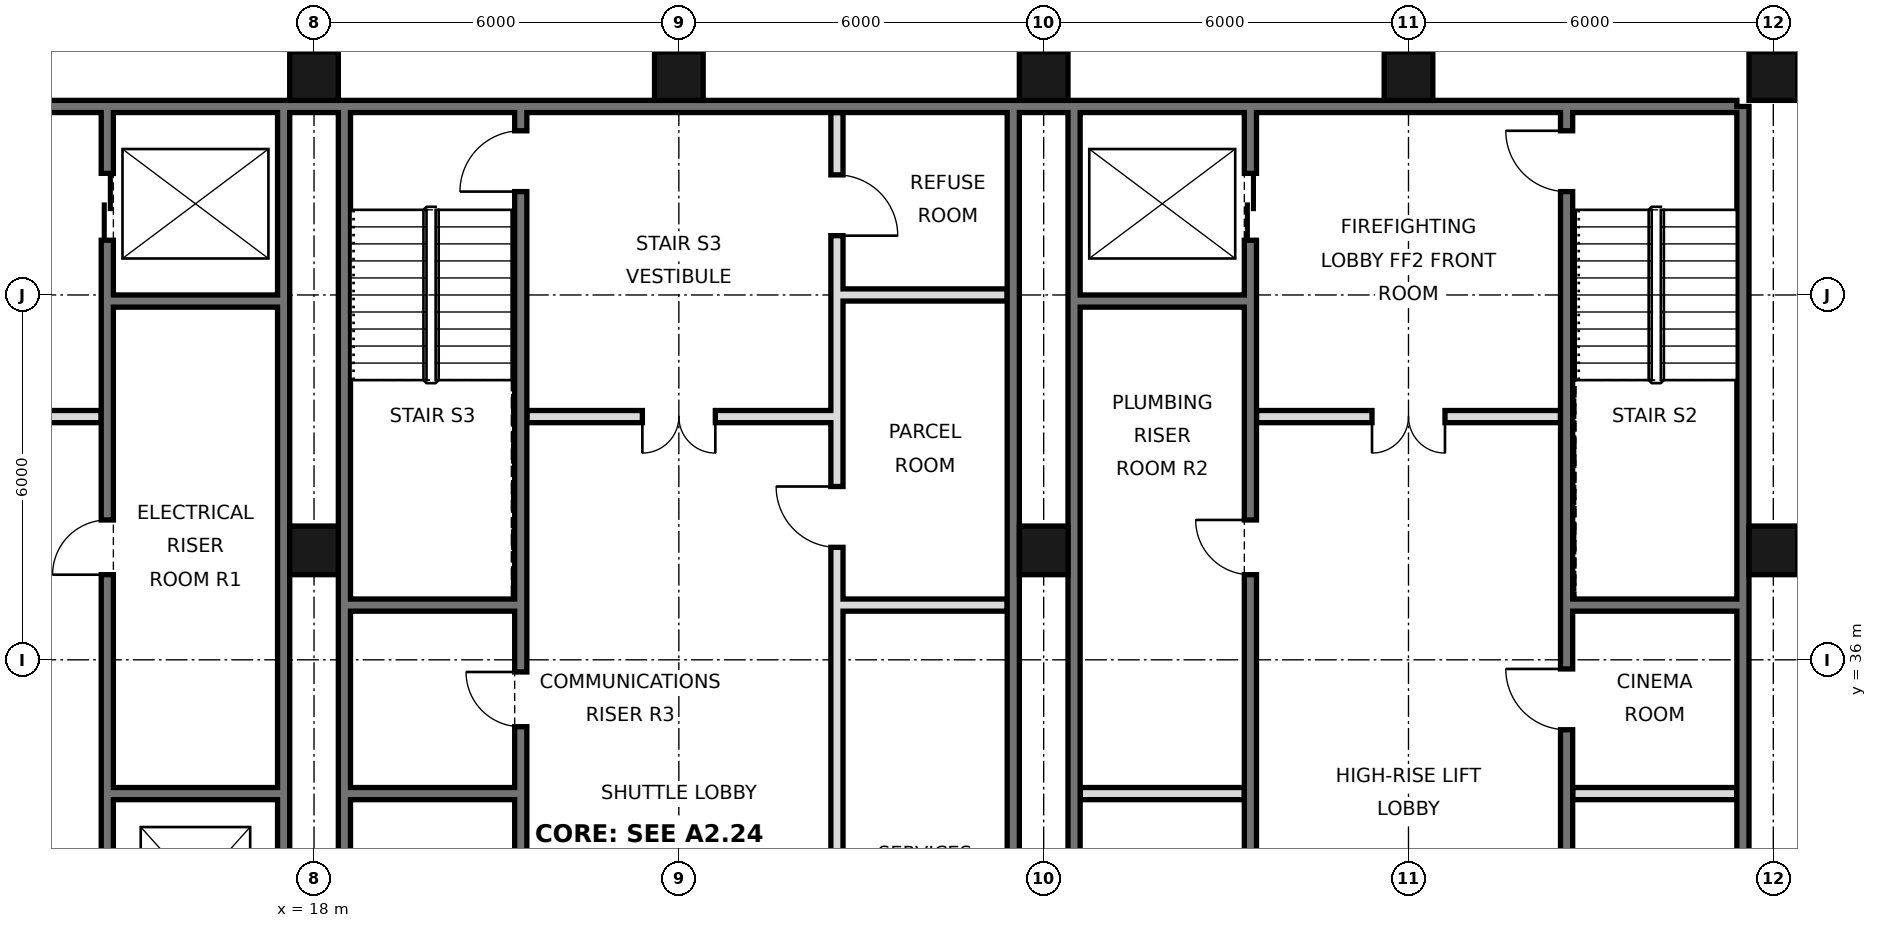
"""IFC4 building model, lengths in metres.
Left out: names, types, materials, properties, quantities, classifications, styles, units other than length and angle.
Written with IfcOpenShell. Run it as: python <this file> out.ifc"""

import sys

from ifc_helpers import new_model, si_unit, direction, frame, frame_2d, origin, origin_2d, place, context, subcontext, project, spatial, rectangle, hollow_rectangle, extrude, element, fill, save


model = new_model("IFC4")
c1 = context("Model", 3, precision=1e-05, world=origin(), true_north=direction((0.0, 1.0)))
c2 = subcontext(c1, "Body", "Model", "MODEL_VIEW")
j1 = project(units=[si_unit("LENGTHUNIT", "METRE"), si_unit("PLANEANGLEUNIT", "RADIAN")], contexts=[c1])
p1 = place(None, origin())
s1 = spatial("IfcSite", under=j1, at=p1, CompositionType="ELEMENT")
p2 = place(p1, origin())
s2 = spatial("IfcBuilding", under=s1, at=p2, CompositionType="ELEMENT")
p3 = place(p2, frame((0.0, 0.0, 96.2)))
s3 = spatial("IfcBuildingStorey", under=s2, at=p3, CompositionType="ELEMENT", Elevation=96.2)
for number, where, z_axis, x_axis in (
    (1, (18.0, 37.8, 0.0), (0.0, 0.0, 1.0), (1.0, 0.0, 0.0)),
    (2, (18.0, 45.6, 0.0), (0.0, 0.0, 1.0), (1.0, 0.0, 0.0)),
    (3, (24.0, 45.6, 0.0), (0.0, 0.0, 1.0), (1.0, 0.0, 0.0)),
    (4, (30.0, 37.8, 0.0), (0.0, 0.0, 1.0), (1.0, 0.0, 0.0)),
    (5, (30.0, 45.6, 0.0), (0.0, 0.0, 1.0), (1.0, 0.0, 0.0)),
    (6, (36.0, 45.6, 0.0), (0.0, 0.0, 1.0), (1.0, 0.0, 0.0)),
    (7, (42.0, 37.8, 0.0), (0.0, 0.0, 1.0), (1.0, 0.0, 0.0)),
    (8, (42.0, 45.6, 0.0), (0.0, 0.0, 1.0), (1.0, 0.0, 0.0)),
):
    element("IfcColumn", number, at=place(p3, frame(where, z_axis=z_axis, x_axis=x_axis)), inside=s3, PredefinedType="COLUMN", context=c2, shape_type="SweptSolid", body=[
        extrude(hollow_rectangle(XDim=0.8, YDim=0.8, WallThickness=0.05, at=origin_2d()), origin(), (0.0, 0.0, 1.0), 3.6),
    ])
p4 = place(p3, frame((41.5, 21.6, 0.0), z_axis=(0.0, 0.0, 1.0), x_axis=(0.0, 1.0, 0.0)))
e9 = element("IfcWall", 9, at=p4, inside=s3, PredefinedType="SOLIDWALL", context=c2, shape_type="SweptSolid", body=[
    extrude(rectangle(XDim=23.5, YDim=0.2, at=frame_2d((11.75, 0.0))), origin(), (0.0, 0.0, 1.0), 3.42),
])
p5 = place(p3, frame((6.6, 45.1, 0.0), z_axis=(0.0, 0.0, 1.0), x_axis=(1.0, 0.0, 0.0)))
e10 = element("IfcWall", 10, at=p5, inside=s3, PredefinedType="SOLIDWALL", context=c2, shape_type="SweptSolid", body=[
    extrude(rectangle(XDim=34.8, YDim=0.2, at=frame_2d((17.4, 0.0))), origin(), (0.0, 0.0, 1.0), 3.42),
])
for number, where, z_axis, x_axis in (
    (11, (17.5, 27.6, 0.0), (0.0, 0.0, 1.0), (0.0, 1.0, 0.0)),
    (12, (18.5, 27.6, 0.0), (0.0, 0.0, 1.0), (0.0, 1.0, 0.0)),
    (13, (29.5, 27.6, 0.0), (0.0, 0.0, 1.0), (0.0, 1.0, 0.0)),
    (14, (30.5, 27.6, 0.0), (0.0, 0.0, 1.0), (0.0, 1.0, 0.0)),
):
    element("IfcWall", number, at=place(p3, frame(where, z_axis=z_axis, x_axis=x_axis)), inside=s3, PredefinedType="SOLIDWALL", context=c2, shape_type="SweptSolid", body=[
        extrude(rectangle(XDim=17.5, YDim=0.2, at=frame_2d((8.75, 0.0))), origin(), (0.0, 0.0, 1.0), 3.42),
    ])
p6 = place(p3, frame((14.6, 27.5, 0.0), z_axis=(0.0, 0.0, 1.0), x_axis=(0.0, 1.0, 0.0)))
e15 = element("IfcWall", 15, at=p6, inside=s3, PredefinedType="SOLIDWALL", context=c2, shape_type="SweptSolid", body=[
    extrude(rectangle(XDim=17.5, YDim=0.2, at=frame_2d((8.75, 0.0))), origin(), (0.0, 0.0, 1.0), 3.42),
])
p7 = place(p6, frame((1.1, 0.0, 0.0)))
e16 = element("IfcOpeningElement", 16, at=p7, cuts=e15, PredefinedType="OPENING", context=c2, shape_type="SweptSolid", body=[
    extrude(rectangle(XDim=1.1, YDim=2.1, at=frame_2d((0.55, 1.05))), frame((0.0, 0.11, 0.0), z_axis=(0.0, -1.0, 0.0), x_axis=(1.0, 0.0, 0.0)), (0.0, 0.0, 1.0), 0.22),
])
p8 = place(p6, frame((4.2, 0.0, 0.0)))
e17 = element("IfcOpeningElement", 17, at=p8, cuts=e15, PredefinedType="OPENING", context=c2, shape_type="SweptSolid", body=[
    extrude(rectangle(XDim=1.1, YDim=2.1, at=frame_2d((0.55, 1.05))), frame((0.0, 0.11, 0.0), z_axis=(0.0, -1.0, 0.0), x_axis=(1.0, 0.0, 0.0)), (0.0, 0.0, 1.0), 0.22),
])
p9 = place(p6, frame((15.4, 0.0, 0.0)))
e18 = element("IfcOpeningElement", 18, at=p9, cuts=e15, PredefinedType="OPENING", context=c2, shape_type="SweptSolid", body=[
    extrude(rectangle(XDim=1.1, YDim=2.1, at=frame_2d((0.55, 1.05))), frame((0.0, 0.11, 0.0), z_axis=(0.0, -1.0, 0.0), x_axis=(1.0, 0.0, 0.0)), (0.0, 0.0, 1.0), 0.22),
])
p10 = place(p6, frame((9.9, 0.0, 0.0)))
e19 = element("IfcOpeningElement", 19, at=p10, cuts=e15, PredefinedType="OPENING", context=c2, shape_type="SweptSolid", body=[
    extrude(rectangle(XDim=0.9, YDim=2.1, at=frame_2d((0.45, 1.05))), frame((0.0, 0.11, 0.0), z_axis=(0.0, -1.0, 0.0), x_axis=(1.0, 0.0, 0.0)), (0.0, 0.0, 1.0), 0.22),
])
p11 = place(p3, frame((21.4, 27.5, 0.0), z_axis=(0.0, 0.0, 1.0), x_axis=(0.0, 1.0, 0.0)))
e20 = element("IfcWall", 20, at=p11, inside=s3, PredefinedType="SOLIDWALL", context=c2, shape_type="SweptSolid", body=[
    extrude(rectangle(XDim=17.5, YDim=0.2, at=frame_2d((8.75, 0.0))), origin(), (0.0, 0.0, 1.0), 3.42),
])
p12 = place(p11, frame((16.2, 0.0, 0.0)))
e21 = element("IfcOpeningElement", 21, at=p12, cuts=e20, PredefinedType="OPENING", context=c2, shape_type="SweptSolid", body=[
    extrude(rectangle(XDim=1.0, YDim=2.1, at=frame_2d((0.5, 1.05))), frame((0.0, 0.11, 0.0), z_axis=(0.0, -1.0, 0.0), x_axis=(1.0, 0.0, 0.0)), (0.0, 0.0, 1.0), 0.22),
])
p13 = place(p11, frame((7.4, 0.0, 0.0)))
e22 = element("IfcOpeningElement", 22, at=p13, cuts=e20, PredefinedType="OPENING", context=c2, shape_type="SweptSolid", body=[
    extrude(rectangle(XDim=0.9, YDim=2.1, at=frame_2d((0.45, 1.05))), frame((0.0, 0.11, 0.0), z_axis=(0.0, -1.0, 0.0), x_axis=(1.0, 0.0, 0.0)), (0.0, 0.0, 1.0), 0.22),
])
p14 = place(p3, frame((26.6, 27.5, 0.0), z_axis=(0.0, 0.0, 1.0), x_axis=(0.0, 1.0, 0.0)))
e23 = element("IfcWall", 23, at=p14, inside=s3, PredefinedType="SOLIDWALL", context=c2, shape_type="SweptSolid", body=[
    extrude(rectangle(XDim=17.5, YDim=0.2, at=frame_2d((8.75, 0.0))), origin(), (0.0, 0.0, 1.0), 3.42),
])
p15 = place(p14, frame((4.3, 0.0, 0.0)))
e24 = element("IfcOpeningElement", 24, at=p15, cuts=e23, PredefinedType="OPENING", context=c2, shape_type="SweptSolid", body=[
    extrude(rectangle(XDim=0.9, YDim=2.1, at=frame_2d((0.45, 1.05))), frame((0.0, 0.11, 0.0), z_axis=(0.0, -1.0, 0.0), x_axis=(1.0, 0.0, 0.0)), (0.0, 0.0, 1.0), 0.22),
])
p16 = place(p14, frame((10.35, 0.0, 0.0)))
e25 = element("IfcOpeningElement", 25, at=p16, cuts=e23, PredefinedType="OPENING", context=c2, shape_type="SweptSolid", body=[
    extrude(rectangle(XDim=1.0, YDim=2.1, at=frame_2d((0.5, 1.05))), frame((0.0, 0.11, 0.0), z_axis=(0.0, -1.0, 0.0), x_axis=(1.0, 0.0, 0.0)), (0.0, 0.0, 1.0), 0.22),
])
p17 = place(p14, frame((15.475, 0.0, 0.0)))
e26 = element("IfcOpeningElement", 26, at=p17, cuts=e23, PredefinedType="OPENING", context=c2, shape_type="SweptSolid", body=[
    extrude(rectangle(XDim=1.0, YDim=2.1, at=frame_2d((0.5, 1.05))), frame((0.0, 0.11, 0.0), z_axis=(0.0, -1.0, 0.0), x_axis=(1.0, 0.0, 0.0)), (0.0, 0.0, 1.0), 0.22),
])
p18 = place(p3, frame((33.4, 27.5, 0.0), z_axis=(0.0, 0.0, 1.0), x_axis=(0.0, 1.0, 0.0)))
e27 = element("IfcWall", 27, at=p18, inside=s3, PredefinedType="SOLIDWALL", context=c2, shape_type="SweptSolid", body=[
    extrude(rectangle(XDim=17.5, YDim=0.2, at=frame_2d((8.75, 0.0))), origin(), (0.0, 0.0, 1.0), 3.42),
])
p19 = place(p18, frame((15.4, 0.0, 0.0)))
e28 = element("IfcOpeningElement", 28, at=p19, cuts=e27, PredefinedType="OPENING", context=c2, shape_type="SweptSolid", body=[
    extrude(rectangle(XDim=1.1, YDim=2.1, at=frame_2d((0.55, 1.05))), frame((0.0, 0.11, 0.0), z_axis=(0.0, -1.0, 0.0), x_axis=(1.0, 0.0, 0.0)), (0.0, 0.0, 1.0), 0.22),
])
p20 = place(p18, frame((2.7, 0.0, 0.0)))
e29 = element("IfcOpeningElement", 29, at=p20, cuts=e27, PredefinedType="OPENING", context=c2, shape_type="SweptSolid", body=[
    extrude(rectangle(XDim=1.0, YDim=2.1, at=frame_2d((0.5, 1.05))), frame((0.0, 0.11, 0.0), z_axis=(0.0, -1.0, 0.0), x_axis=(1.0, 0.0, 0.0)), (0.0, 0.0, 1.0), 0.22),
])
p21 = place(p18, frame((9.9, 0.0, 0.0)))
e30 = element("IfcOpeningElement", 30, at=p21, cuts=e27, PredefinedType="OPENING", context=c2, shape_type="SweptSolid", body=[
    extrude(rectangle(XDim=0.9, YDim=2.1, at=frame_2d((0.45, 1.05))), frame((0.0, 0.11, 0.0), z_axis=(0.0, -1.0, 0.0), x_axis=(1.0, 0.0, 0.0)), (0.0, 0.0, 1.0), 0.22),
])
p22 = place(p3, frame((38.6, 21.6, 0.0), z_axis=(0.0, 0.0, 1.0), x_axis=(0.0, 1.0, 0.0)))
e31 = element("IfcWall", 31, at=p22, inside=s3, PredefinedType="SOLIDWALL", context=c2, shape_type="SweptSolid", body=[
    extrude(rectangle(XDim=23.4, YDim=0.2, at=frame_2d((11.7, 0.0))), origin(), (0.0, 0.0, 1.0), 3.42),
])
p23 = place(p22, frame((8.6, 0.0, 0.0)))
e32 = element("IfcOpeningElement", 32, at=p23, cuts=e31, PredefinedType="OPENING", context=c2, shape_type="SweptSolid", body=[
    extrude(rectangle(XDim=1.0, YDim=2.1, at=frame_2d((0.5, 1.05))), frame((0.0, 0.11, 0.0), z_axis=(0.0, -1.0, 0.0), x_axis=(1.0, 0.0, 0.0)), (0.0, 0.0, 1.0), 0.22),
])
p24 = place(p22, frame((13.25, 0.0, 0.0)))
e33 = element("IfcOpeningElement", 33, at=p24, cuts=e31, PredefinedType="OPENING", context=c2, shape_type="SweptSolid", body=[
    extrude(rectangle(XDim=1.0, YDim=2.1, at=frame_2d((0.5, 1.05))), frame((0.0, 0.11, 0.0), z_axis=(0.0, -1.0, 0.0), x_axis=(1.0, 0.0, 0.0)), (0.0, 0.0, 1.0), 0.22),
])
p25 = place(p22, frame((22.1, 0.0, 0.0)))
e34 = element("IfcOpeningElement", 34, at=p25, cuts=e31, PredefinedType="OPENING", context=c2, shape_type="SweptSolid", body=[
    extrude(rectangle(XDim=1.0, YDim=2.1, at=frame_2d((0.5, 1.05))), frame((0.0, 0.11, 0.0), z_axis=(0.0, -1.0, 0.0), x_axis=(1.0, 0.0, 0.0)), (0.0, 0.0, 1.0), 0.22),
])
p26 = place(p22, frame((0.175, 0.0, 0.0)))
e35 = element("IfcOpeningElement", 35, at=p26, cuts=e31, PredefinedType="OPENING", context=c2, shape_type="SweptSolid", body=[
    extrude(rectangle(XDim=0.9, YDim=2.1, at=frame_2d((0.45, 1.05))), frame((0.0, 0.11, 0.0), z_axis=(0.0, -1.0, 0.0), x_axis=(1.0, 0.0, 0.0)), (0.0, 0.0, 1.0), 0.22),
])
for number, where, z_axis, x_axis in (
    (36, (14.7, 33.8, 0.0), (0.0, 0.0, 1.0), (1.0, 0.0, 0.0)),
    (37, (18.6, 33.8, 0.0), (0.0, 0.0, 1.0), (1.0, 0.0, 0.0)),
    (38, (30.6, 33.8, 0.0), (0.0, 0.0, 1.0), (1.0, 0.0, 0.0)),
):
    element("IfcWall", number, at=place(p3, frame(where, z_axis=z_axis, x_axis=x_axis)), inside=s3, PredefinedType="SOLIDWALL", context=c2, shape_type="SweptSolid", body=[
        extrude(rectangle(XDim=2.7, YDim=0.2, at=frame_2d((1.35, 0.0))), origin(), (0.0, 0.0, 1.0), 3.42),
    ])
p27 = place(p3, frame((38.7, 33.8, 0.0), z_axis=(0.0, 0.0, 1.0), x_axis=(1.0, 0.0, 0.0)))
e39 = element("IfcWall", 39, at=p27, inside=s3, PredefinedType="PARTITIONING", context=c2, shape_type="SweptSolid", body=[
    extrude(rectangle(XDim=2.7, YDim=0.2, at=frame_2d((1.35, 0.0))), origin(), (0.0, 0.0, 1.0), 3.42),
])
for number, where, z_axis, x_axis in (
    (40, (18.6, 36.9, 0.0), (0.0, 0.0, 1.0), (1.0, 0.0, 0.0)),
    (41, (26.7, 36.9, 0.0), (0.0, 0.0, 1.0), (1.0, 0.0, 0.0)),
    (42, (38.7, 36.9, 0.0), (0.0, 0.0, 1.0), (1.0, 0.0, 0.0)),
):
    element("IfcWall", number, at=place(p3, frame(where, z_axis=z_axis, x_axis=x_axis)), inside=s3, PredefinedType="SOLIDWALL", context=c2, shape_type="SweptSolid", body=[
        extrude(rectangle(XDim=2.7, YDim=0.2, at=frame_2d((1.35, 0.0))), origin(), (0.0, 0.0, 1.0), 3.42),
    ])
p28 = place(p3, frame((21.5, 40.0, 0.0), z_axis=(0.0, 0.0, 1.0), x_axis=(1.0, 0.0, 0.0)))
e43 = element("IfcWall", 43, at=p28, inside=s3, PredefinedType="PARTITIONING", context=c2, shape_type="SweptSolid", body=[
    extrude(rectangle(XDim=5.0, YDim=0.2, at=frame_2d((2.5, 0.0))), origin(), (0.0, 0.0, 1.0), 3.42),
])
p29 = place(p28, frame((1.9, 0.0, 0.0)))
e44 = element("IfcOpeningElement", 44, at=p29, cuts=e43, PredefinedType="OPENING", context=c2, shape_type="SweptSolid", body=[
    extrude(rectangle(XDim=1.2, YDim=2.1, at=frame_2d((0.6, 1.05))), frame((0.0, 0.11, 0.0), z_axis=(0.0, -1.0, 0.0), x_axis=(1.0, 0.0, 0.0)), (0.0, 0.0, 1.0), 0.22),
])
p30 = place(p3, frame((33.5, 40.0, 0.0), z_axis=(0.0, 0.0, 1.0), x_axis=(1.0, 0.0, 0.0)))
e45 = element("IfcWall", 45, at=p30, inside=s3, PredefinedType="PARTITIONING", context=c2, shape_type="SweptSolid", body=[
    extrude(rectangle(XDim=5.0, YDim=0.2, at=frame_2d((2.5, 0.0))), origin(), (0.0, 0.0, 1.0), 3.42),
])
p31 = place(p30, frame((1.9, 0.0, 0.0)))
e46 = element("IfcOpeningElement", 46, at=p31, cuts=e45, PredefinedType="OPENING", context=c2, shape_type="SweptSolid", body=[
    extrude(rectangle(XDim=1.2, YDim=2.1, at=frame_2d((0.6, 1.05))), frame((0.0, 0.11, 0.0), z_axis=(0.0, -1.0, 0.0), x_axis=(1.0, 0.0, 0.0)), (0.0, 0.0, 1.0), 0.22),
])
p32 = place(p3, frame((9.5, 40.0, 0.0), z_axis=(0.0, 0.0, 1.0), x_axis=(1.0, 0.0, 0.0)))
e47 = element("IfcWall", 47, at=p32, inside=s3, PredefinedType="PARTITIONING", context=c2, shape_type="SweptSolid", body=[
    extrude(rectangle(XDim=5.0, YDim=0.2, at=frame_2d((2.5, 0.0))), origin(), (0.0, 0.0, 1.0), 3.42),
])
p33 = place(p32, frame((1.9, 0.0, 0.0)))
e48 = element("IfcOpeningElement", 48, at=p33, cuts=e47, PredefinedType="OPENING", context=c2, shape_type="SweptSolid", body=[
    extrude(rectangle(XDim=1.2, YDim=2.1, at=frame_2d((0.6, 1.05))), frame((0.0, 0.11, 0.0), z_axis=(0.0, -1.0, 0.0), x_axis=(1.0, 0.0, 0.0)), (0.0, 0.0, 1.0), 0.22),
])
for number, where, z_axis, x_axis in (
    (49, (14.7, 41.9, 0.0), (0.0, 0.0, 1.0), (1.0, 0.0, 0.0)),
    (50, (30.6, 41.9, 0.0), (0.0, 0.0, 1.0), (1.0, 0.0, 0.0)),
):
    element("IfcWall", number, at=place(p3, frame(where, z_axis=z_axis, x_axis=x_axis)), inside=s3, PredefinedType="SOLIDWALL", context=c2, shape_type="SweptSolid", body=[
        extrude(rectangle(XDim=2.7, YDim=0.2, at=frame_2d((1.35, 0.0))), origin(), (0.0, 0.0, 1.0), 3.42),
    ])
p34 = place(p3, frame((26.7, 42.0, 0.0), z_axis=(0.0, 0.0, 1.0), x_axis=(1.0, 0.0, 0.0)))
e51 = element("IfcWall", 51, at=p34, inside=s3, PredefinedType="PARTITIONING", context=c2, shape_type="SweptSolid", body=[
    extrude(rectangle(XDim=2.7, YDim=0.2, at=frame_2d((1.35, 0.0))), origin(), (0.0, 0.0, 1.0), 3.42),
])
p35 = place(p29, frame((1.2, 0.0, 0.0), z_axis=(0.0, 0.0, 1.0), x_axis=(-1.0, 0.0, 0.0)))
e52 = element("IfcDoor", 52, at=p35, inside=s3, OperationType="DOUBLE_DOOR_SINGLE_SWING", PredefinedType="DOOR", context=c2, shape_type="SweptSolid", body=[
    extrude(rectangle(XDim=1.2, YDim=2.1, at=frame_2d((0.6, 1.05))), frame((0.0, 0.025, 0.0), z_axis=(0.0, -1.0, 0.0), x_axis=(1.0, 0.0, 0.0)), (0.0, 0.0, 1.0), 0.05),
])
fill(e44, e52)
p36 = place(p31, frame((1.2, 0.0, 0.0), z_axis=(0.0, 0.0, 1.0), x_axis=(-1.0, 0.0, 0.0)))
e53 = element("IfcDoor", 53, at=p36, inside=s3, OperationType="DOUBLE_DOOR_SINGLE_SWING", PredefinedType="DOOR", context=c2, shape_type="SweptSolid", body=[
    extrude(rectangle(XDim=1.2, YDim=2.1, at=frame_2d((0.6, 1.05))), frame((0.0, 0.025, 0.0), z_axis=(0.0, -1.0, 0.0), x_axis=(1.0, 0.0, 0.0)), (0.0, 0.0, 1.0), 0.05),
])
fill(e46, e53)
p37 = place(p19, origin())
e54 = element("IfcDoor", 54, at=p37, inside=s3, OperationType="DOUBLE_DOOR_SLIDING", PredefinedType="DOOR", context=c2, shape_type="SweptSolid", body=[
    extrude(rectangle(XDim=1.1, YDim=2.1, at=frame_2d((0.55, 1.05))), frame((0.0, 0.025, 0.0), z_axis=(0.0, -1.0, 0.0), x_axis=(1.0, 0.0, 0.0)), (0.0, 0.0, 1.0), 0.05),
])
fill(e28, e54)
p38 = place(p9, origin())
e55 = element("IfcDoor", 55, at=p38, inside=s3, OperationType="DOUBLE_DOOR_SLIDING", PredefinedType="DOOR", context=c2, shape_type="SweptSolid", body=[
    extrude(rectangle(XDim=1.1, YDim=2.1, at=frame_2d((0.55, 1.05))), frame((0.0, 0.025, 0.0), z_axis=(0.0, -1.0, 0.0), x_axis=(1.0, 0.0, 0.0)), (0.0, 0.0, 1.0), 0.05),
])
fill(e18, e55)
p39 = place(p24, frame((1.0, 0.0, 0.0), z_axis=(0.0, 0.0, 1.0), x_axis=(-1.0, 0.0, 0.0)))
e56 = element("IfcDoor", 56, at=p39, inside=s3, OperationType="SINGLE_SWING_LEFT", PredefinedType="DOOR", context=c2, shape_type="SweptSolid", body=[
    extrude(rectangle(XDim=1.0, YDim=2.1, at=frame_2d((0.5, 1.05))), frame((0.0, 0.025, 0.0), z_axis=(0.0, -1.0, 0.0), x_axis=(1.0, 0.0, 0.0)), (0.0, 0.0, 1.0), 0.05),
])
fill(e33, e56)
p40 = place(p25, frame((1.0, 0.0, 0.0), z_axis=(0.0, 0.0, 1.0), x_axis=(-1.0, 0.0, 0.0)))
e57 = element("IfcDoor", 57, at=p40, inside=s3, OperationType="SINGLE_SWING_LEFT", PredefinedType="DOOR", context=c2, shape_type="SweptSolid", body=[
    extrude(rectangle(XDim=1.0, YDim=2.1, at=frame_2d((0.5, 1.05))), frame((0.0, 0.025, 0.0), z_axis=(0.0, -1.0, 0.0), x_axis=(1.0, 0.0, 0.0)), (0.0, 0.0, 1.0), 0.05),
])
fill(e34, e57)
p41 = place(p12, origin())
e58 = element("IfcDoor", 58, at=p41, inside=s3, OperationType="SINGLE_SWING_LEFT", PredefinedType="DOOR", context=c2, shape_type="SweptSolid", body=[
    extrude(rectangle(XDim=1.0, YDim=2.1, at=frame_2d((0.5, 1.05))), frame((0.0, 0.025, 0.0), z_axis=(0.0, -1.0, 0.0), x_axis=(1.0, 0.0, 0.0)), (0.0, 0.0, 1.0), 0.05),
])
fill(e21, e58)
p42 = place(p10, origin())
e59 = element("IfcDoor", 59, at=p42, inside=s3, OperationType="SINGLE_SWING_LEFT", PredefinedType="DOOR", context=c2, shape_type="SweptSolid", body=[
    extrude(rectangle(XDim=0.9, YDim=2.1, at=frame_2d((0.45, 1.05))), frame((0.0, 0.025, 0.0), z_axis=(0.0, -1.0, 0.0), x_axis=(1.0, 0.0, 0.0)), (0.0, 0.0, 1.0), 0.05),
])
fill(e19, e59)
p43 = place(p21, frame((0.9, 0.0, 0.0), z_axis=(0.0, 0.0, 1.0), x_axis=(-1.0, 0.0, 0.0)))
e60 = element("IfcDoor", 60, at=p43, inside=s3, OperationType="SINGLE_SWING_LEFT", PredefinedType="DOOR", context=c2, shape_type="SweptSolid", body=[
    extrude(rectangle(XDim=0.9, YDim=2.1, at=frame_2d((0.45, 1.05))), frame((0.0, 0.025, 0.0), z_axis=(0.0, -1.0, 0.0), x_axis=(1.0, 0.0, 0.0)), (0.0, 0.0, 1.0), 0.05),
])
fill(e30, e60)
p44 = place(p13, frame((0.9, 0.0, 0.0), z_axis=(0.0, 0.0, 1.0), x_axis=(-1.0, 0.0, 0.0)))
e61 = element("IfcDoor", 61, at=p44, inside=s3, OperationType="SINGLE_SWING_LEFT", PredefinedType="DOOR", context=c2, shape_type="SweptSolid", body=[
    extrude(rectangle(XDim=0.9, YDim=2.1, at=frame_2d((0.45, 1.05))), frame((0.0, 0.025, 0.0), z_axis=(0.0, -1.0, 0.0), x_axis=(1.0, 0.0, 0.0)), (0.0, 0.0, 1.0), 0.05),
])
fill(e22, e61)
p45 = place(p16, frame((1.0, 0.0, 0.0), z_axis=(0.0, 0.0, 1.0), x_axis=(-1.0, 0.0, 0.0)))
e62 = element("IfcDoor", 62, at=p45, inside=s3, OperationType="SINGLE_SWING_LEFT", PredefinedType="DOOR", context=c2, shape_type="SweptSolid", body=[
    extrude(rectangle(XDim=1.0, YDim=2.1, at=frame_2d((0.5, 1.05))), frame((0.0, 0.025, 0.0), z_axis=(0.0, -1.0, 0.0), x_axis=(1.0, 0.0, 0.0)), (0.0, 0.0, 1.0), 0.05),
])
fill(e25, e62)
p46 = place(p17, frame((1.0, 0.0, 0.0), z_axis=(0.0, 0.0, 1.0), x_axis=(-1.0, 0.0, 0.0)))
e63 = element("IfcDoor", 63, at=p46, inside=s3, OperationType="SINGLE_SWING_RIGHT", PredefinedType="DOOR", context=c2, shape_type="SweptSolid", body=[
    extrude(rectangle(XDim=1.0, YDim=2.1, at=frame_2d((0.5, 1.05))), frame((0.0, 0.025, 0.0), z_axis=(0.0, -1.0, 0.0), x_axis=(1.0, 0.0, 0.0)), (0.0, 0.0, 1.0), 0.05),
])
fill(e26, e63)
save(model, sys.argv[1])
